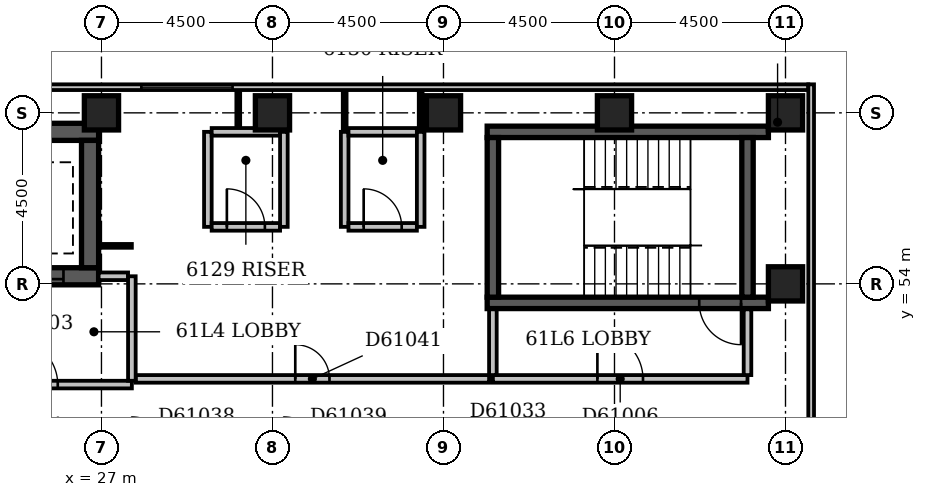
"""IFC4 building model, lengths in metres.
Left out: names, types, materials, properties, quantities, classifications, styles, units other than length and angle.
Written with IfcOpenShell. Run it as: python <this file> out.ifc"""

import sys

from ifc_helpers import new_model, si_unit, direction, frame, frame_2d, origin, origin_2d, place, context, subcontext, project, spatial, rectangle, extrude, element, fill, save


model = new_model("IFC4")
c1 = context("Model", 3, precision=1e-05, world=origin(), true_north=direction((0.0, 1.0)))
c2 = subcontext(c1, "Body", "Model", "MODEL_VIEW")
j1 = project(units=[si_unit("LENGTHUNIT", "METRE"), si_unit("PLANEANGLEUNIT", "RADIAN")], contexts=[c1])
p1 = place(None, origin())
s1 = spatial("IfcSite", under=j1, at=p1, CompositionType="ELEMENT")
p2 = place(p1, origin())
s2 = spatial("IfcBuilding", under=s1, at=p2, CompositionType="ELEMENT")
p3 = place(p2, frame((0.0, 0.0, 236.6)))
s3 = spatial("IfcBuildingStorey", under=s2, at=p3, CompositionType="ELEMENT", Elevation=236.6)
p4 = place(p3, frame((23.975, 54.2, -0.3), z_axis=(0.0, 0.0, 1.0), x_axis=(1.0, 0.0, 0.0)))
e1 = element("IfcWall", 1, at=p4, inside=s3, PredefinedType="SHEAR", context=c2, shape_type="SweptSolid", body=[
    extrude(rectangle(XDim=2.95, YDim=0.45, at=frame_2d((1.475, 0.0))), origin(), (0.0, 0.0, 1.0), 3.6),
])
p5 = place(p4, frame((0.925, 0.0, 0.3)))
e2 = element("IfcOpeningElement", 2, at=p5, cuts=e1, PredefinedType="OPENING", context=c2, shape_type="SweptSolid", body=[
    extrude(rectangle(XDim=1.1, YDim=2.1, at=frame_2d((0.55, 1.05))), frame((0.0, 0.237, 0.0), z_axis=(0.0, -1.0, 0.0), x_axis=(1.0, 0.0, 0.0)), (0.0, 0.0, 1.0), 0.474),
])
p6 = place(p3, frame((23.975, 58.0, -0.3), z_axis=(0.0, 0.0, 1.0), x_axis=(1.0, 0.0, 0.0)))
e3 = element("IfcWall", 3, at=p6, inside=s3, PredefinedType="SHEAR", context=c2, shape_type="SweptSolid", body=[
    extrude(rectangle(XDim=2.95, YDim=0.45, at=frame_2d((1.475, 0.0))), origin(), (0.0, 0.0, 1.0), 3.6),
])
p7 = place(p3, frame((26.7, 54.425, -0.3), z_axis=(0.0, 0.0, 1.0), x_axis=(0.0, 1.0, 0.0)))
e4 = element("IfcWall", 4, at=p7, inside=s3, PredefinedType="SHEAR", context=c2, shape_type="SweptSolid", body=[
    extrude(rectangle(XDim=3.35, YDim=0.45, at=frame_2d((1.675, 0.0))), origin(), (0.0, 0.0, 1.0), 3.6),
])
p8 = place(p3, frame((37.15, 53.5, -0.3), z_axis=(0.0, 0.0, 1.0), x_axis=(1.0, 0.0, 0.0)))
e5 = element("IfcWall", 5, at=p8, inside=s3, PredefinedType="SHEAR", context=c2, shape_type="SweptSolid", body=[
    extrude(rectangle(XDim=7.4, YDim=0.3, at=frame_2d((3.7, 0.0))), origin(), (0.0, 0.0, 1.0), 3.6),
])
p9 = place(p8, frame((5.58, 0.0, 0.3)))
e6 = element("IfcOpeningElement", 6, at=p9, cuts=e5, PredefinedType="OPENING", context=c2, shape_type="SweptSolid", body=[
    extrude(rectangle(XDim=1.1, YDim=2.1, at=frame_2d((0.55, 1.05))), frame((0.0, 0.162, 0.0), z_axis=(0.0, -1.0, 0.0), x_axis=(1.0, 0.0, 0.0)), (0.0, 0.0, 1.0), 0.324),
])
p10 = place(p3, frame((37.15, 58.0, -0.3), z_axis=(0.0, 0.0, 1.0), x_axis=(1.0, 0.0, 0.0)))
e7 = element("IfcWall", 7, at=p10, inside=s3, PredefinedType="SHEAR", context=c2, shape_type="SweptSolid", body=[
    extrude(rectangle(XDim=7.4, YDim=0.3, at=frame_2d((3.7, 0.0))), origin(), (0.0, 0.0, 1.0), 3.6),
])
for number, where, z_axis, x_axis in (
    (8, (37.3, 53.65, -0.3), (0.0, 0.0, 1.0), (0.0, 1.0, 0.0)),
    (9, (44.0, 53.65, -0.3), (0.0, 0.0, 1.0), (0.0, 1.0, 0.0)),
):
    element("IfcWall", number, at=place(p3, frame(where, z_axis=z_axis, x_axis=x_axis)), inside=s3, PredefinedType="SHEAR", context=c2, shape_type="SweptSolid", body=[
        extrude(rectangle(XDim=4.2, YDim=0.3, at=frame_2d((2.1, 0.0))), origin(), (0.0, 0.0, 1.0), 3.6),
    ])
for number, where, z_axis, x_axis in (
    (10, (45.0, 54.0, -0.3), (0.0, 0.0, 1.0), (1.0, 0.0, 0.0)),
    (11, (27.0, 58.5, -0.3), (0.0, 0.0, 1.0), (1.0, 0.0, 0.0)),
    (12, (31.5, 58.5, -0.3), (0.0, 0.0, 1.0), (1.0, 0.0, 0.0)),
    (13, (36.0, 58.5, -0.3), (0.0, 0.0, 1.0), (1.0, 0.0, 0.0)),
    (14, (40.5, 58.5, -0.3), (0.0, 0.0, 1.0), (1.0, 0.0, 0.0)),
    (15, (45.0, 58.5, -0.3), (0.0, 0.0, 1.0), (1.0, 0.0, 0.0)),
):
    element("IfcColumn", number, at=place(p3, frame(where, z_axis=z_axis, x_axis=x_axis)), inside=s3, PredefinedType="COLUMN", context=c2, shape_type="SweptSolid", body=[
        extrude(rectangle(XDim=0.9, YDim=0.9, at=origin_2d()), origin(), (0.0, 0.0, 1.0), 3.6),
    ])
p11 = place(p3, frame((45.675, 39.9, 0.0), z_axis=(0.0, 0.0, 1.0), x_axis=(0.0, 1.0, 0.0)))
e16 = element("IfcWall", 16, at=p11, inside=s3, PredefinedType="STANDARD", context=c2, shape_type="SweptSolid", body=[
    extrude(rectangle(XDim=19.35, YDim=0.15, at=frame_2d((9.675, 0.0))), origin(), (0.0, 0.0, 1.0), 2.7),
])
p12 = place(p11, frame((6.15, 0.0, 0.6)))
e17 = element("IfcOpeningElement", 17, at=p12, cuts=e16, PredefinedType="OPENING", context=c2, shape_type="SweptSolid", body=[
    extrude(rectangle(XDim=2.4, YDim=1.8, at=frame_2d((1.2, 0.9))), frame((0.0, 0.087, 0.0), z_axis=(0.0, -1.0, 0.0), x_axis=(1.0, 0.0, 0.0)), (0.0, 0.0, 1.0), 0.174),
])
p13 = place(p3, frame((45.6, 59.175, 0.0), z_axis=(0.0, 0.0, 1.0), x_axis=(-1.0, 0.0, 0.0)))
e18 = element("IfcWall", 18, at=p13, inside=s3, PredefinedType="STANDARD", context=c2, shape_type="SweptSolid", body=[
    extrude(rectangle(XDim=46.35, YDim=0.15, at=frame_2d((23.175, 0.0))), origin(), (0.0, 0.0, 1.0), 2.7),
])
p14 = place(p13, frame((15.15, 0.0, 0.6)))
e19 = element("IfcOpeningElement", 19, at=p14, cuts=e18, PredefinedType="OPENING", context=c2, shape_type="SweptSolid", body=[
    extrude(rectangle(XDim=2.4, YDim=1.8, at=frame_2d((1.2, 0.9))), frame((0.0, 0.087, 0.0), z_axis=(0.0, -1.0, 0.0), x_axis=(1.0, 0.0, 0.0)), (0.0, 0.0, 1.0), 0.174),
])
p15 = place(p3, frame((23.0, 51.35, 0.0), z_axis=(0.0, 0.0, 1.0), x_axis=(1.0, 0.0, 0.0)))
e20 = element("IfcWall", 20, at=p15, inside=s3, PredefinedType="PARTITIONING", context=c2, shape_type="SweptSolid", body=[
    extrude(rectangle(XDim=4.8, YDim=0.2, at=frame_2d((2.4, 0.0))), origin(), (0.0, 0.0, 1.0), 3.3),
])
p16 = place(p15, frame((1.65, 0.0, 0.0)))
e21 = element("IfcOpeningElement", 21, at=p16, cuts=e20, PredefinedType="OPENING", context=c2, shape_type="SweptSolid", body=[
    extrude(rectangle(XDim=1.2, YDim=2.1, at=frame_2d((0.6, 1.05))), frame((0.0, 0.112, 0.0), z_axis=(0.0, -1.0, 0.0), x_axis=(1.0, 0.0, 0.0)), (0.0, 0.0, 1.0), 0.224),
])
p17 = place(p3, frame((27.8, 51.45, 0.0), z_axis=(0.0, 0.0, 1.0), x_axis=(0.0, 1.0, 0.0)))
e22 = element("IfcWall", 22, at=p17, inside=s3, PredefinedType="PARTITIONING", context=c2, shape_type="SweptSolid", body=[
    extrude(rectangle(XDim=2.75, YDim=0.2, at=frame_2d((1.375, 0.0))), origin(), (0.0, 0.0, 1.0), 3.3),
])
p18 = place(p3, frame((26.925, 54.2, 0.0), z_axis=(0.0, 0.0, 1.0), x_axis=(1.0, 0.0, 0.0)))
e23 = element("IfcWall", 23, at=p18, inside=s3, PredefinedType="PARTITIONING", context=c2, shape_type="SweptSolid", body=[
    extrude(rectangle(XDim=0.775, YDim=0.2, at=frame_2d((0.387, 0.0))), origin(), (0.0, 0.0, 1.0), 3.3),
])
p19 = place(p3, frame((37.3, 51.5, 0.0), z_axis=(0.0, 0.0, 1.0), x_axis=(1.0, 0.0, 0.0)))
e24 = element("IfcWall", 24, at=p19, inside=s3, PredefinedType="PARTITIONING", context=c2, shape_type="SweptSolid", body=[
    extrude(rectangle(XDim=6.7, YDim=0.2, at=frame_2d((3.35, 0.0))), origin(), (0.0, 0.0, 1.0), 3.3),
])
p20 = place(p19, frame((2.75, 0.0, 0.0)))
e25 = element("IfcOpeningElement", 25, at=p20, cuts=e24, PredefinedType="OPENING", context=c2, shape_type="SweptSolid", body=[
    extrude(rectangle(XDim=1.2, YDim=2.1, at=frame_2d((0.6, 1.05))), frame((0.0, 0.112, 0.0), z_axis=(0.0, -1.0, 0.0), x_axis=(1.0, 0.0, 0.0)), (0.0, 0.0, 1.0), 0.224),
])
for number, where, z_axis, x_axis in (
    (26, (44.0, 51.6, 0.0), (0.0, 0.0, 1.0), (0.0, 1.0, 0.0)),
    (27, (37.3, 51.6, 0.0), (0.0, 0.0, 1.0), (0.0, 1.0, 0.0)),
):
    element("IfcWall", number, at=place(p3, frame(where, z_axis=z_axis, x_axis=x_axis)), inside=s3, PredefinedType="PARTITIONING", context=c2, shape_type="SweptSolid", body=[
        extrude(rectangle(XDim=1.73, YDim=0.2, at=frame_2d((0.865, 0.0))), origin(), (0.0, 0.0, 1.0), 3.3),
    ])
p21 = place(p3, frame((27.9, 51.5, 0.0), z_axis=(0.0, 0.0, 1.0), x_axis=(1.0, 0.0, 0.0)))
e28 = element("IfcWall", 28, at=p21, inside=s3, PredefinedType="PARTITIONING", context=c2, shape_type="SweptSolid", body=[
    extrude(rectangle(XDim=9.3, YDim=0.2, at=frame_2d((4.65, 0.0))), origin(), (0.0, 0.0, 1.0), 3.3),
])
p22 = place(p21, frame((4.2, 0.0, 0.0)))
e29 = element("IfcOpeningElement", 29, at=p22, cuts=e28, PredefinedType="OPENING", context=c2, shape_type="SweptSolid", body=[
    extrude(rectangle(XDim=0.9, YDim=2.1, at=frame_2d((0.45, 1.05))), frame((0.0, 0.112, 0.0), z_axis=(0.0, -1.0, 0.0), x_axis=(1.0, 0.0, 0.0)), (0.0, 0.0, 1.0), 0.224),
])
p23 = place(p3, frame((26.925, 55.0, 0.0), z_axis=(0.0, 0.0, 1.0), x_axis=(1.0, 0.0, 0.0)))
e30 = element("IfcWall", 30, at=p23, inside=s3, PredefinedType="PARTITIONING", context=c2, shape_type="SweptSolid", body=[
    extrude(rectangle(XDim=0.875, YDim=0.1, at=frame_2d((0.438, 0.0))), origin(), (0.0, 0.0, 1.0), 3.3),
])
p24 = place(p3, frame((29.8, 55.5, 0.0), z_axis=(0.0, 0.0, 1.0), x_axis=(0.0, 1.0, 0.0)))
e31 = element("IfcWall", 31, at=p24, inside=s3, PredefinedType="PARTITIONING", context=c2, shape_type="SweptSolid", body=[
    extrude(rectangle(XDim=2.5, YDim=0.2, at=frame_2d((1.25, 0.0))), origin(), (0.0, 0.0, 1.0), 3.3),
])
p25 = place(p3, frame((29.9, 55.5, 0.0), z_axis=(0.0, 0.0, 1.0), x_axis=(1.0, 0.0, 0.0)))
e32 = element("IfcWall", 32, at=p25, inside=s3, PredefinedType="PARTITIONING", context=c2, shape_type="SweptSolid", body=[
    extrude(rectangle(XDim=1.8, YDim=0.2, at=frame_2d((0.9, 0.0))), origin(), (0.0, 0.0, 1.0), 3.3),
])
p26 = place(p25, frame((0.4, 0.0, 0.0)))
e33 = element("IfcOpeningElement", 33, at=p26, cuts=e32, PredefinedType="OPENING", context=c2, shape_type="SweptSolid", body=[
    extrude(rectangle(XDim=1.0, YDim=2.1, at=frame_2d((0.5, 1.05))), frame((0.0, 0.112, 0.0), z_axis=(0.0, -1.0, 0.0), x_axis=(1.0, 0.0, 0.0)), (0.0, 0.0, 1.0), 0.224),
])
for number, where, z_axis, x_axis in (
    (34, (31.8, 55.5, 0.0), (0.0, 0.0, 1.0), (0.0, 1.0, 0.0)),
    (35, (33.4, 55.5, 0.0), (0.0, 0.0, 1.0), (0.0, 1.0, 0.0)),
):
    element("IfcWall", number, at=place(p3, frame(where, z_axis=z_axis, x_axis=x_axis)), inside=s3, PredefinedType="PARTITIONING", context=c2, shape_type="SweptSolid", body=[
        extrude(rectangle(XDim=2.5, YDim=0.2, at=frame_2d((1.25, 0.0))), origin(), (0.0, 0.0, 1.0), 3.3),
    ])
p27 = place(p3, frame((33.5, 55.5, 0.0), z_axis=(0.0, 0.0, 1.0), x_axis=(1.0, 0.0, 0.0)))
e36 = element("IfcWall", 36, at=p27, inside=s3, PredefinedType="PARTITIONING", context=c2, shape_type="SweptSolid", body=[
    extrude(rectangle(XDim=1.8, YDim=0.2, at=frame_2d((0.9, 0.0))), origin(), (0.0, 0.0, 1.0), 3.3),
])
p28 = place(p27, frame((0.4, 0.0, 0.0)))
e37 = element("IfcOpeningElement", 37, at=p28, cuts=e36, PredefinedType="OPENING", context=c2, shape_type="SweptSolid", body=[
    extrude(rectangle(XDim=1.0, YDim=2.1, at=frame_2d((0.5, 1.05))), frame((0.0, 0.112, 0.0), z_axis=(0.0, -1.0, 0.0), x_axis=(1.0, 0.0, 0.0)), (0.0, 0.0, 1.0), 0.224),
])
p29 = place(p3, frame((35.4, 55.5, 0.0), z_axis=(0.0, 0.0, 1.0), x_axis=(0.0, 1.0, 0.0)))
e38 = element("IfcWall", 38, at=p29, inside=s3, PredefinedType="PARTITIONING", context=c2, shape_type="SweptSolid", body=[
    extrude(rectangle(XDim=2.5, YDim=0.2, at=frame_2d((1.25, 0.0))), origin(), (0.0, 0.0, 1.0), 3.3),
])
p30 = place(p3, frame((29.9, 58.0, 0.0), z_axis=(0.0, 0.0, 1.0), x_axis=(1.0, 0.0, 0.0)))
e39 = element("IfcWall", 39, at=p30, inside=s3, PredefinedType="PARTITIONING", context=c2, shape_type="SweptSolid", body=[
    extrude(rectangle(XDim=1.8, YDim=0.2, at=frame_2d((0.9, 0.0))), origin(), (0.0, 0.0, 1.0), 3.3),
])
p31 = place(p3, frame((33.4, 58.0, 0.0), z_axis=(0.0, 0.0, 1.0), x_axis=(0.0, 1.0, 0.0)))
e40 = element("IfcWall", 40, at=p31, inside=s3, PredefinedType="PARTITIONING", context=c2, shape_type="SweptSolid", body=[
    extrude(rectangle(XDim=1.1, YDim=0.1, at=frame_2d((0.55, 0.0))), origin(), (0.0, 0.0, 1.0), 3.3),
])
p32 = place(p3, frame((33.5, 58.0, 0.0), z_axis=(0.0, 0.0, 1.0), x_axis=(1.0, 0.0, 0.0)))
e41 = element("IfcWall", 41, at=p32, inside=s3, PredefinedType="PARTITIONING", context=c2, shape_type="SweptSolid", body=[
    extrude(rectangle(XDim=1.8, YDim=0.2, at=frame_2d((0.9, 0.0))), origin(), (0.0, 0.0, 1.0), 3.3),
])
p33 = place(p3, frame((35.4, 58.0, 0.0), z_axis=(0.0, 0.0, 1.0), x_axis=(0.0, 1.0, 0.0)))
e42 = element("IfcWall", 42, at=p33, inside=s3, PredefinedType="PARTITIONING", context=c2, shape_type="SweptSolid", body=[
    extrude(rectangle(XDim=1.1, YDim=0.1, at=frame_2d((0.55, 0.0))), origin(), (0.0, 0.0, 1.0), 3.3),
])
p34 = place(p3, frame((30.6, 58.1, 0.0), z_axis=(0.0, 0.0, 1.0), x_axis=(0.0, 1.0, 0.0)))
e43 = element("IfcWall", 43, at=p34, inside=s3, PredefinedType="PARTITIONING", context=c2, shape_type="SweptSolid", body=[
    extrude(rectangle(XDim=1.0, YDim=0.1, at=frame_2d((0.5, 0.0))), origin(), (0.0, 0.0, 1.0), 3.3),
])
p35 = place(p14, origin())
e44 = element("IfcWindow", 44, at=p35, inside=s3, PartitioningType="SINGLE_PANEL", PredefinedType="WINDOW", context=c2, shape_type="SweptSolid", body=[
    extrude(rectangle(XDim=2.4, YDim=1.8, at=frame_2d((1.2, 0.9))), frame((0.0, 0.03, 0.0), z_axis=(0.0, -1.0, 0.0), x_axis=(1.0, 0.0, 0.0)), (0.0, 0.0, 1.0), 0.06),
])
fill(e19, e44)
p36 = place(p16, origin())
e45 = element("IfcDoor", 45, at=p36, inside=s3, OperationType="SINGLE_SWING_LEFT", PredefinedType="DOOR", context=c2, shape_type="SweptSolid", body=[
    extrude(rectangle(XDim=1.2, YDim=2.1, at=frame_2d((0.6, 1.05))), frame((0.0, 0.025, 0.0), z_axis=(0.0, -1.0, 0.0), x_axis=(1.0, 0.0, 0.0)), (0.0, 0.0, 1.0), 0.05),
])
fill(e21, e45)
p37 = place(p5, origin())
e46 = element("IfcDoor", 46, at=p37, inside=s3, OperationType="SLIDING_TO_LEFT", PredefinedType="DOOR", context=c2, shape_type="SweptSolid", body=[
    extrude(rectangle(XDim=1.1, YDim=2.1, at=frame_2d((0.55, 1.05))), frame((0.0, 0.025, 0.0), z_axis=(0.0, -1.0, 0.0), x_axis=(1.0, 0.0, 0.0)), (0.0, 0.0, 1.0), 0.05),
])
fill(e2, e46)
p38 = place(p20, origin())
e47 = element("IfcDoor", 47, at=p38, inside=s3, OperationType="SINGLE_SWING_LEFT", PredefinedType="DOOR", context=c2, shape_type="SweptSolid", body=[
    extrude(rectangle(XDim=1.2, YDim=2.1, at=frame_2d((0.6, 1.05))), frame((0.0, 0.025, 0.0), z_axis=(0.0, -1.0, 0.0), x_axis=(1.0, 0.0, 0.0)), (0.0, 0.0, 1.0), 0.05),
])
fill(e25, e47)
p39 = place(p9, origin())
e48 = element("IfcDoor", 48, at=p39, inside=s3, OperationType="SINGLE_SWING_RIGHT", PredefinedType="DOOR", context=c2, shape_type="SweptSolid", body=[
    extrude(rectangle(XDim=1.1, YDim=2.1, at=frame_2d((0.55, 1.05))), frame((0.0, 0.025, 0.0), z_axis=(0.0, -1.0, 0.0), x_axis=(1.0, 0.0, 0.0)), (0.0, 0.0, 1.0), 0.05),
])
fill(e6, e48)
p40 = place(p22, origin())
e49 = element("IfcDoor", 49, at=p40, inside=s3, OperationType="SINGLE_SWING_LEFT", PredefinedType="DOOR", context=c2, shape_type="SweptSolid", body=[
    extrude(rectangle(XDim=0.9, YDim=2.1, at=frame_2d((0.45, 1.05))), frame((0.0, 0.025, 0.0), z_axis=(0.0, -1.0, 0.0), x_axis=(1.0, 0.0, 0.0)), (0.0, 0.0, 1.0), 0.05),
])
fill(e29, e49)
p41 = place(p26, origin())
e50 = element("IfcDoor", 50, at=p41, inside=s3, OperationType="SINGLE_SWING_LEFT", PredefinedType="DOOR", context=c2, shape_type="SweptSolid", body=[
    extrude(rectangle(XDim=1.0, YDim=2.1, at=frame_2d((0.5, 1.05))), frame((0.0, 0.025, 0.0), z_axis=(0.0, -1.0, 0.0), x_axis=(1.0, 0.0, 0.0)), (0.0, 0.0, 1.0), 0.05),
])
fill(e33, e50)
p42 = place(p28, origin())
e51 = element("IfcDoor", 51, at=p42, inside=s3, OperationType="SINGLE_SWING_LEFT", PredefinedType="DOOR", context=c2, shape_type="SweptSolid", body=[
    extrude(rectangle(XDim=1.0, YDim=2.1, at=frame_2d((0.5, 1.05))), frame((0.0, 0.025, 0.0), z_axis=(0.0, -1.0, 0.0), x_axis=(1.0, 0.0, 0.0)), (0.0, 0.0, 1.0), 0.05),
])
fill(e37, e51)
save(model, sys.argv[1])
